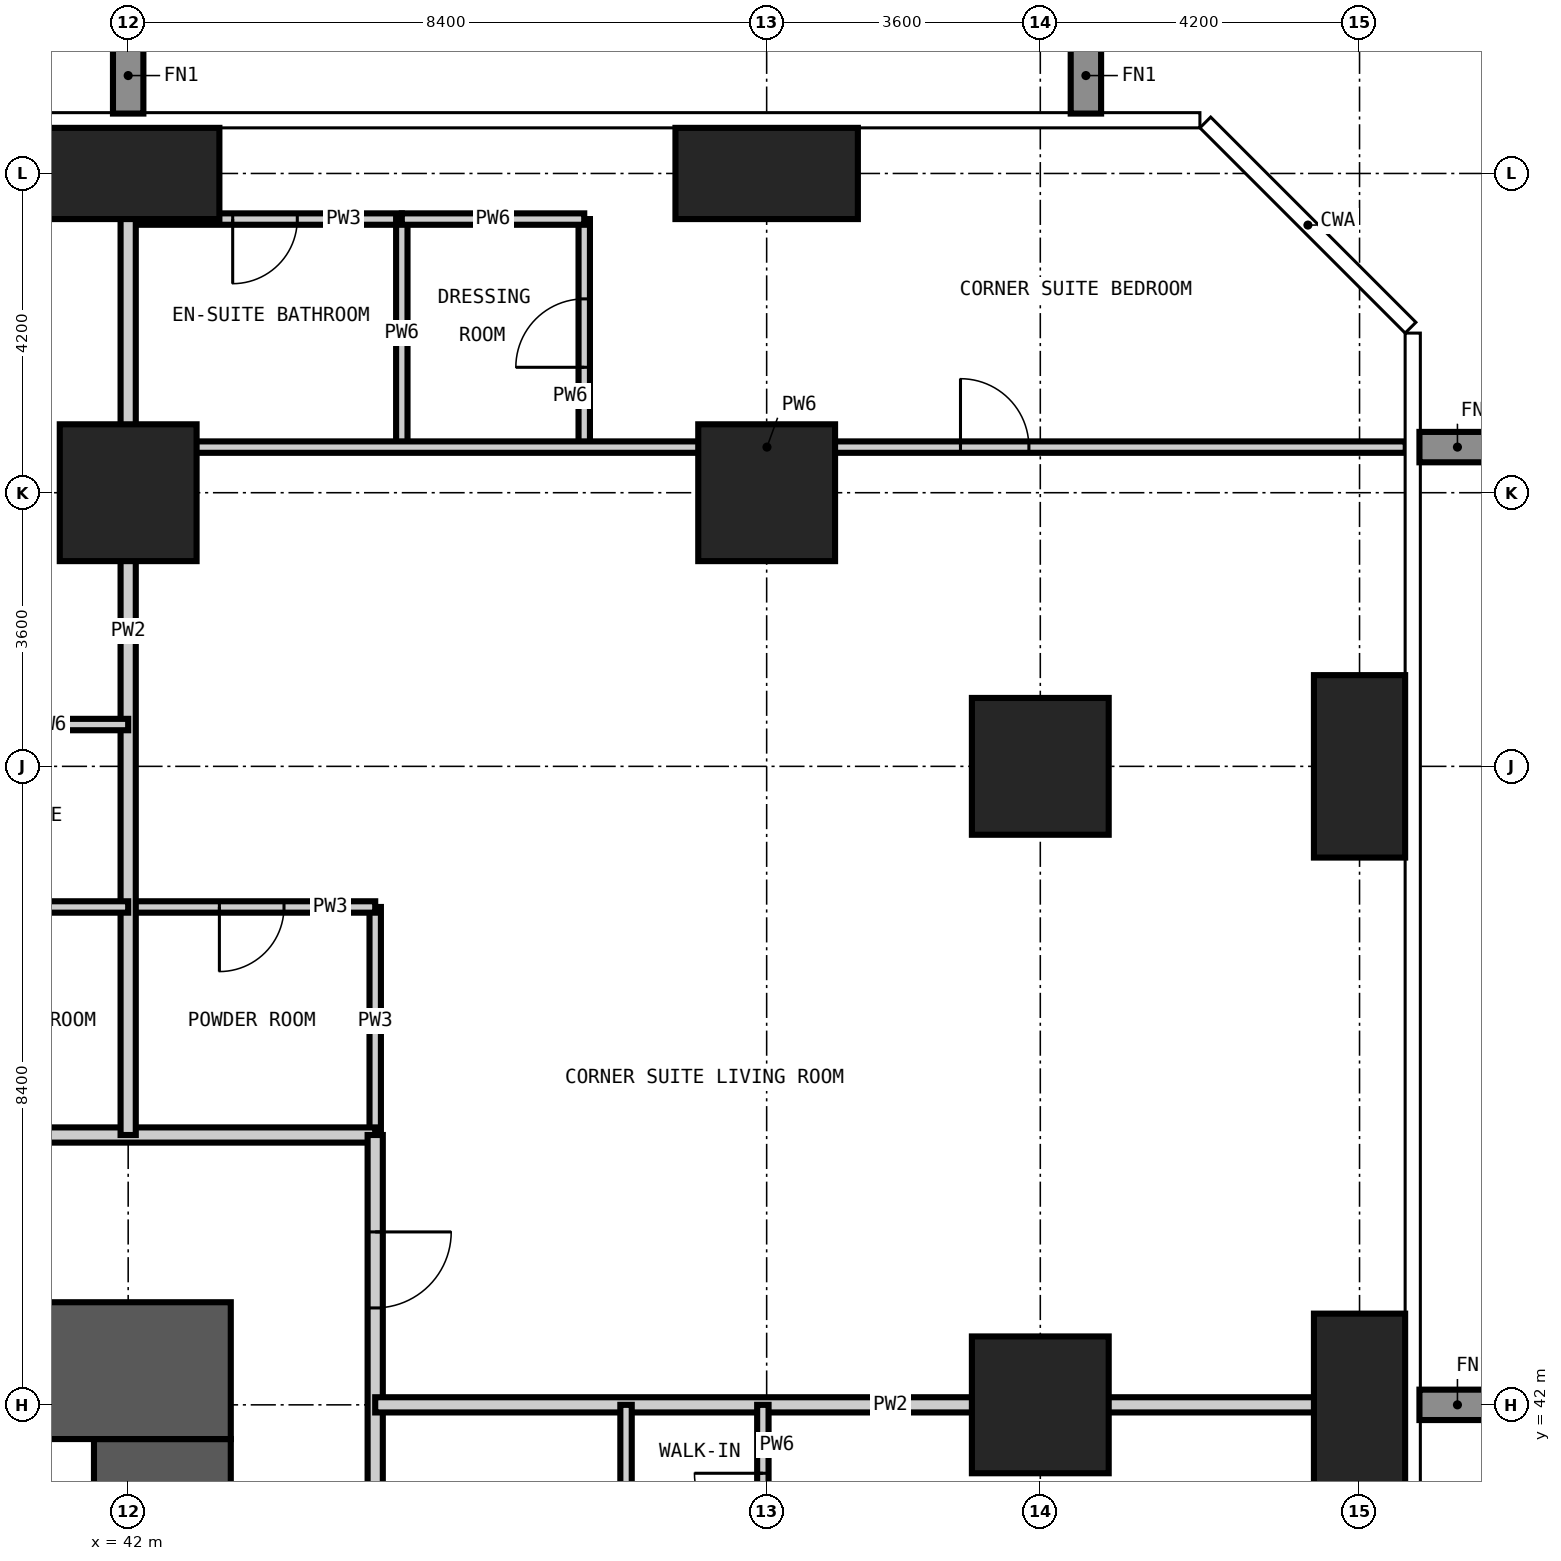
"""IFC4 building model, lengths in metres.
Left out: names, types, materials, properties, quantities, classifications, styles, units other than length and angle.
Written with IfcOpenShell. Run it as: python <this file> out.ifc"""

import sys

from ifc_helpers import new_model, si_unit, direction, frame, frame_2d, origin, origin_2d, place, context, subcontext, project, spatial, rectangle, extrude, element, fill, save


model = new_model("IFC4")
c1 = context("Model", 3, precision=1e-05, world=origin(), true_north=direction((0.0, 1.0)))
c2 = subcontext(c1, "Body", "Model", "MODEL_VIEW")
j1 = project(units=[si_unit("LENGTHUNIT", "METRE"), si_unit("PLANEANGLEUNIT", "RADIAN")], contexts=[c1])
p1 = place(None, origin())
s1 = spatial("IfcSite", under=j1, at=p1, CompositionType="ELEMENT")
p2 = place(p1, origin())
s2 = spatial("IfcBuilding", under=s1, at=p2, CompositionType="ELEMENT")
p3 = place(p2, frame((0.0, 0.0, 45.0)))
s3 = spatial("IfcBuildingStorey", under=s2, at=p3, CompositionType="ELEMENT", Elevation=45.0)
p4 = place(p3, frame((42.0, 54.0, -0.35), z_axis=(0.0, 0.0, 1.0), x_axis=(1.0, 0.0, 0.0)))
e1 = element("IfcColumn", 1, at=p4, inside=s3, PredefinedType="COLUMN", context=c2, shape_type="SweptSolid", body=[
    extrude(rectangle(XDim=1.8, YDim=1.8, at=origin_2d()), origin(), (0.0, 0.0, 1.0), 3.6),
])
p5 = place(p3, frame((42.0, 58.2, -0.35), z_axis=(0.0, 0.0, 1.0), x_axis=(1.0, 0.0, 0.0)))
e2 = element("IfcColumn", 2, at=p5, inside=s3, PredefinedType="COLUMN", context=c2, shape_type="SweptSolid", body=[
    extrude(rectangle(XDim=2.4, YDim=1.2, at=origin_2d()), origin(), (0.0, 0.0, 1.0), 3.6),
])
p6 = place(p3, frame((50.4, 54.0, -0.35), z_axis=(0.0, 0.0, 1.0), x_axis=(1.0, 0.0, 0.0)))
e3 = element("IfcColumn", 3, at=p6, inside=s3, PredefinedType="COLUMN", context=c2, shape_type="SweptSolid", body=[
    extrude(rectangle(XDim=1.8, YDim=1.8, at=origin_2d()), origin(), (0.0, 0.0, 1.0), 3.6),
])
p7 = place(p3, frame((50.4, 58.2, -0.35), z_axis=(0.0, 0.0, 1.0), x_axis=(1.0, 0.0, 0.0)))
e4 = element("IfcColumn", 4, at=p7, inside=s3, PredefinedType="COLUMN", context=c2, shape_type="SweptSolid", body=[
    extrude(rectangle(XDim=2.4, YDim=1.2, at=origin_2d()), origin(), (0.0, 0.0, 1.0), 3.6),
])
for number, where, z_axis, x_axis in (
    (5, (54.0, 42.0, -0.35), (0.0, 0.0, 1.0), (1.0, 0.0, 0.0)),
    (6, (54.0, 50.4, -0.35), (0.0, 0.0, 1.0), (1.0, 0.0, 0.0)),
):
    element("IfcColumn", number, at=place(p3, frame(where, z_axis=z_axis, x_axis=x_axis)), inside=s3, PredefinedType="COLUMN", context=c2, shape_type="SweptSolid", body=[
        extrude(rectangle(XDim=1.8, YDim=1.8, at=origin_2d()), origin(), (0.0, 0.0, 1.0), 3.6),
    ])
for number, where, z_axis, x_axis in (
    (7, (58.2, 42.0, -0.35), (0.0, 0.0, 1.0), (1.0, 0.0, 0.0)),
    (8, (58.2, 50.4, -0.35), (0.0, 0.0, 1.0), (1.0, 0.0, 0.0)),
):
    element("IfcColumn", number, at=place(p3, frame(where, z_axis=z_axis, x_axis=x_axis)), inside=s3, PredefinedType="COLUMN", context=c2, shape_type="SweptSolid", body=[
        extrude(rectangle(XDim=1.2, YDim=2.4, at=origin_2d()), origin(), (0.0, 0.0, 1.0), 3.6),
    ])
p8 = place(p3, frame((42.45, 17.25, -0.35), z_axis=(0.0, 0.0, 1.0), x_axis=(0.0, 1.0, 0.0)))
e9 = element("IfcWall", 9, at=p8, inside=s3, PredefinedType="SHEAR", context=c2, shape_type="SweptSolid", body=[
    extrude(rectangle(XDim=24.3, YDim=1.8, at=frame_2d((12.15, 0.0))), origin(), (0.0, 0.0, 1.0), 3.6),
])
p9 = place(p8, frame((0.35, 0.0, 0.35)))
e10 = element("IfcOpeningElement", 10, at=p9, cuts=e9, PredefinedType="OPENING", context=c2, shape_type="SweptSolid", body=[
    extrude(rectangle(XDim=1.2, YDim=2.2, at=frame_2d((0.6, 1.1))), frame((0.0, 0.91, 0.0), z_axis=(0.0, -1.0, 0.0), x_axis=(1.0, 0.0, 0.0)), (0.0, 0.0, 1.0), 1.82),
])
p10 = place(p8, frame((11.65, 0.0, 0.35)))
e11 = element("IfcOpeningElement", 11, at=p10, cuts=e9, PredefinedType="OPENING", context=c2, shape_type="SweptSolid", body=[
    extrude(rectangle(XDim=1.0, YDim=2.1, at=frame_2d((0.5, 1.05))), frame((0.0, 0.91, 0.0), z_axis=(0.0, -1.0, 0.0), x_axis=(1.0, 0.0, 0.0)), (0.0, 0.0, 1.0), 1.82),
])
p11 = place(p8, frame((20.05, 0.0, 0.35)))
e12 = element("IfcOpeningElement", 12, at=p11, cuts=e9, PredefinedType="OPENING", context=c2, shape_type="SweptSolid", body=[
    extrude(rectangle(XDim=1.0, YDim=2.1, at=frame_2d((0.5, 1.05))), frame((0.0, 0.91, 0.0), z_axis=(0.0, -1.0, 0.0), x_axis=(1.0, 0.0, 0.0)), (0.0, 0.0, 1.0), 1.82),
])
p12 = place(p3, frame((43.35, 42.45, -0.35), z_axis=(0.0, 0.0, 1.0), x_axis=(-1.0, 0.0, 0.0)))
e13 = element("IfcWall", 13, at=p12, inside=s3, PredefinedType="SHEAR", context=c2, shape_type="SweptSolid", body=[
    extrude(rectangle(XDim=27.9, YDim=1.8, at=frame_2d((13.95, 0.0))), origin(), (0.0, 0.0, 1.0), 3.6),
])
p13 = place(p12, frame((21.85, 0.0, 0.35)))
e14 = element("IfcOpeningElement", 14, at=p13, cuts=e13, PredefinedType="OPENING", context=c2, shape_type="SweptSolid", body=[
    extrude(rectangle(XDim=1.0, YDim=2.1, at=frame_2d((0.5, 1.05))), frame((0.0, 0.91, 0.0), z_axis=(0.0, -1.0, 0.0), x_axis=(1.0, 0.0, 0.0)), (0.0, 0.0, 1.0), 1.82),
])
p14 = place(p12, frame((11.25, 0.0, 0.35)))
e15 = element("IfcOpeningElement", 15, at=p14, cuts=e13, PredefinedType="OPENING", context=c2, shape_type="SweptSolid", body=[
    extrude(rectangle(XDim=1.2, YDim=2.2, at=frame_2d((0.6, 1.1))), frame((0.0, 0.91, 0.0), z_axis=(0.0, -1.0, 0.0), x_axis=(1.0, 0.0, 0.0)), (0.0, 0.0, 1.0), 1.82),
])
p15 = place(p3, frame((45.25, 45.55, 0.0), z_axis=(0.0, 0.0, 1.0), x_axis=(0.0, 1.0, 0.0)))
e16 = element("IfcWall", 16, at=p15, inside=s3, PredefinedType="PARTITIONING", context=c2, shape_type="SweptSolid", body=[
    extrude(rectangle(XDim=3.0, YDim=0.15, at=frame_2d((1.5, 0.0))), origin(), (0.0, 0.0, 1.0), 3.25),
])
p16 = place(p3, frame((42.0, 48.55, 0.0), z_axis=(0.0, 0.0, 1.0), x_axis=(1.0, 0.0, 0.0)))
e17 = element("IfcWall", 17, at=p16, inside=s3, PredefinedType="PARTITIONING", context=c2, shape_type="SweptSolid", body=[
    extrude(rectangle(XDim=3.25, YDim=0.15, at=frame_2d((1.625, 0.0))), origin(), (0.0, 0.0, 1.0), 3.25),
])
p17 = place(p16, frame((1.2, 0.0, 0.0)))
e18 = element("IfcOpeningElement", 18, at=p17, cuts=e17, PredefinedType="OPENING", context=c2, shape_type="SweptSolid", body=[
    extrude(rectangle(XDim=0.85, YDim=2.1, at=frame_2d((0.425, 1.05))), frame((0.0, 0.085, 0.0), z_axis=(0.0, -1.0, 0.0), x_axis=(1.0, 0.0, 0.0)), (0.0, 0.0, 1.0), 0.17),
])
p18 = place(p3, frame((42.0, 57.6, 0.0), z_axis=(0.0, 0.0, 1.0), x_axis=(1.0, 0.0, 0.0)))
e19 = element("IfcWall", 19, at=p18, inside=s3, PredefinedType="PARTITIONING", context=c2, shape_type="SweptSolid", body=[
    extrude(rectangle(XDim=3.6, YDim=0.15, at=frame_2d((1.8, 0.0))), origin(), (0.0, 0.0, 1.0), 3.25),
])
p19 = place(p18, frame((1.375, 0.0, 0.0)))
e20 = element("IfcOpeningElement", 20, at=p19, cuts=e19, PredefinedType="OPENING", context=c2, shape_type="SweptSolid", body=[
    extrude(rectangle(XDim=0.85, YDim=2.1, at=frame_2d((0.425, 1.05))), frame((0.0, 0.085, 0.0), z_axis=(0.0, -1.0, 0.0), x_axis=(1.0, 0.0, 0.0)), (0.0, 0.0, 1.0), 0.17),
])
p20 = place(p3, frame((12.95, 45.55, 0.0), z_axis=(0.0, 0.0, 1.0), x_axis=(1.0, 0.0, 0.0)))
e21 = element("IfcWall", 21, at=p20, inside=s3, PredefinedType="PARTITIONING", context=c2, shape_type="SweptSolid", body=[
    extrude(rectangle(XDim=32.3, YDim=0.2, at=frame_2d((16.15, 0.0))), origin(), (0.0, 0.0, 1.0), 3.25),
])
p21 = place(p20, frame((6.65, 0.0, 0.0)))
e22 = element("IfcOpeningElement", 22, at=p21, cuts=e21, PredefinedType="OPENING", context=c2, shape_type="SweptSolid", body=[
    extrude(rectangle(XDim=1.0, YDim=2.2, at=frame_2d((0.5, 1.1))), frame((0.0, 0.11, 0.0), z_axis=(0.0, -1.0, 0.0), x_axis=(1.0, 0.0, 0.0)), (0.0, 0.0, 1.0), 0.22),
])
p22 = place(p20, frame((15.05, 0.0, 0.0)))
e23 = element("IfcOpeningElement", 23, at=p22, cuts=e21, PredefinedType="OPENING", context=c2, shape_type="SweptSolid", body=[
    extrude(rectangle(XDim=1.0, YDim=2.2, at=frame_2d((0.5, 1.1))), frame((0.0, 0.11, 0.0), z_axis=(0.0, -1.0, 0.0), x_axis=(1.0, 0.0, 0.0)), (0.0, 0.0, 1.0), 0.22),
])
p23 = place(p20, frame((23.45, 0.0, 0.0)))
e24 = element("IfcOpeningElement", 24, at=p23, cuts=e21, PredefinedType="OPENING", context=c2, shape_type="SweptSolid", body=[
    extrude(rectangle(XDim=1.0, YDim=2.2, at=frame_2d((0.5, 1.1))), frame((0.0, 0.11, 0.0), z_axis=(0.0, -1.0, 0.0), x_axis=(1.0, 0.0, 0.0)), (0.0, 0.0, 1.0), 0.22),
])
p24 = place(p3, frame((45.25, 45.55, 0.0), z_axis=(0.0, 0.0, 1.0), x_axis=(0.0, -1.0, 0.0)))
e25 = element("IfcWall", 25, at=p24, inside=s3, PredefinedType="PARTITIONING", context=c2, shape_type="SweptSolid", body=[
    extrude(rectangle(XDim=32.6, YDim=0.2, at=frame_2d((16.3, 0.0))), origin(), (0.0, 0.0, 1.0), 3.25),
])
p25 = place(p24, frame((24.8, 0.0, 0.0)))
e26 = element("IfcOpeningElement", 26, at=p25, cuts=e25, PredefinedType="OPENING", context=c2, shape_type="SweptSolid", body=[
    extrude(rectangle(XDim=1.0, YDim=2.2, at=frame_2d((0.5, 1.1))), frame((0.0, 0.11, 0.0), z_axis=(0.0, -1.0, 0.0), x_axis=(1.0, 0.0, 0.0)), (0.0, 0.0, 1.0), 0.22),
])
p26 = place(p24, frame((19.85, 0.0, 0.0)))
e27 = element("IfcOpeningElement", 27, at=p26, cuts=e25, PredefinedType="OPENING", context=c2, shape_type="SweptSolid", body=[
    extrude(rectangle(XDim=1.0, YDim=2.2, at=frame_2d((0.5, 1.1))), frame((0.0, 0.11, 0.0), z_axis=(0.0, -1.0, 0.0), x_axis=(1.0, 0.0, 0.0)), (0.0, 0.0, 1.0), 0.22),
])
p27 = place(p24, frame((11.45, 0.0, 0.0)))
e28 = element("IfcOpeningElement", 28, at=p27, cuts=e25, PredefinedType="OPENING", context=c2, shape_type="SweptSolid", body=[
    extrude(rectangle(XDim=1.0, YDim=2.2, at=frame_2d((0.5, 1.1))), frame((0.0, 0.11, 0.0), z_axis=(0.0, -1.0, 0.0), x_axis=(1.0, 0.0, 0.0)), (0.0, 0.0, 1.0), 0.22),
])
p28 = place(p24, frame((6.5, 0.0, 0.0)))
e29 = element("IfcOpeningElement", 29, at=p28, cuts=e25, PredefinedType="OPENING", context=c2, shape_type="SweptSolid", body=[
    extrude(rectangle(XDim=1.0, YDim=2.2, at=frame_2d((0.5, 1.1))), frame((0.0, 0.11, 0.0), z_axis=(0.0, -1.0, 0.0), x_axis=(1.0, 0.0, 0.0)), (0.0, 0.0, 1.0), 0.22),
])
p29 = place(p24, frame((30.175, 0.0, 0.0)))
e30 = element("IfcOpeningElement", 30, at=p29, cuts=e25, PredefinedType="OPENING", context=c2, shape_type="SweptSolid", body=[
    extrude(rectangle(XDim=1.0, YDim=2.2, at=frame_2d((0.5, 1.1))), frame((0.0, 0.11, 0.0), z_axis=(0.0, -1.0, 0.0), x_axis=(1.0, 0.0, 0.0)), (0.0, 0.0, 1.0), 0.22),
])
p30 = place(p24, frame((1.275, 0.0, 0.0)))
e31 = element("IfcOpeningElement", 31, at=p30, cuts=e25, PredefinedType="OPENING", context=c2, shape_type="SweptSolid", body=[
    extrude(rectangle(XDim=1.0, YDim=2.2, at=frame_2d((0.5, 1.1))), frame((0.0, 0.11, 0.0), z_axis=(0.0, -1.0, 0.0), x_axis=(1.0, 0.0, 0.0)), (0.0, 0.0, 1.0), 0.22),
])
p31 = place(p3, frame((42.0, 45.55, 0.0), z_axis=(0.0, 0.0, 1.0), x_axis=(0.0, 1.0, 0.0)))
e32 = element("IfcWall", 32, at=p31, inside=s3, PredefinedType="PARTITIONING", context=c2, shape_type="SweptSolid", body=[
    extrude(rectangle(XDim=13.258, YDim=0.2, at=frame_2d((6.629, 0.0))), origin(), (0.0, 0.0, 1.0), 3.25),
])
p32 = place(p3, frame((45.25, 42.0, 0.0), z_axis=(0.0, 0.0, 1.0), x_axis=(1.0, 0.0, 0.0)))
e33 = element("IfcWall", 33, at=p32, inside=s3, PredefinedType="PARTITIONING", context=c2, shape_type="SweptSolid", body=[
    extrude(rectangle(XDim=13.558, YDim=0.2, at=frame_2d((6.779, 0.0))), origin(), (0.0, 0.0, 1.0), 3.25),
])
p33 = place(p3, frame((45.6, 54.6, 0.0), z_axis=(0.0, 0.0, 1.0), x_axis=(0.0, 1.0, 0.0)))
e34 = element("IfcWall", 34, at=p33, inside=s3, PredefinedType="PARTITIONING", context=c2, shape_type="SweptSolid", body=[
    extrude(rectangle(XDim=3.0, YDim=0.15, at=frame_2d((1.5, 0.0))), origin(), (0.0, 0.0, 1.0), 3.25),
])
p34 = place(p3, frame((48.0, 54.6, 0.0), z_axis=(0.0, 0.0, 1.0), x_axis=(0.0, 1.0, 0.0)))
e35 = element("IfcWall", 35, at=p34, inside=s3, PredefinedType="PARTITIONING", context=c2, shape_type="SweptSolid", body=[
    extrude(rectangle(XDim=3.0, YDim=0.15, at=frame_2d((1.5, 0.0))), origin(), (0.0, 0.0, 1.0), 3.25),
])
p35 = place(p34, frame((1.05, 0.0, 0.0)))
e36 = element("IfcOpeningElement", 36, at=p35, cuts=e35, PredefinedType="OPENING", context=c2, shape_type="SweptSolid", body=[
    extrude(rectangle(XDim=0.9, YDim=2.1, at=frame_2d((0.45, 1.05))), frame((0.0, 0.085, 0.0), z_axis=(0.0, -1.0, 0.0), x_axis=(1.0, 0.0, 0.0)), (0.0, 0.0, 1.0), 0.17),
])
p36 = place(p3, frame((48.55, 39.3, 0.0), z_axis=(0.0, 0.0, 1.0), x_axis=(0.0, 1.0, 0.0)))
e37 = element("IfcWall", 37, at=p36, inside=s3, PredefinedType="PARTITIONING", context=c2, shape_type="SweptSolid", body=[
    extrude(rectangle(XDim=2.7, YDim=0.15, at=frame_2d((1.35, 0.0))), origin(), (0.0, 0.0, 1.0), 3.25),
])
p37 = place(p3, frame((50.35, 39.3, 0.0), z_axis=(0.0, 0.0, 1.0), x_axis=(0.0, 1.0, 0.0)))
e38 = element("IfcWall", 38, at=p37, inside=s3, PredefinedType="PARTITIONING", context=c2, shape_type="SweptSolid", body=[
    extrude(rectangle(XDim=2.7, YDim=0.15, at=frame_2d((1.35, 0.0))), origin(), (0.0, 0.0, 1.0), 3.25),
])
p38 = place(p37, frame((0.9, 0.0, 0.0)))
e39 = element("IfcOpeningElement", 39, at=p38, cuts=e38, PredefinedType="OPENING", context=c2, shape_type="SweptSolid", body=[
    extrude(rectangle(XDim=0.9, YDim=2.1, at=frame_2d((0.45, 1.05))), frame((0.0, 0.085, 0.0), z_axis=(0.0, -1.0, 0.0), x_axis=(1.0, 0.0, 0.0)), (0.0, 0.0, 1.0), 0.17),
])
p39 = place(p3, frame((37.8, 48.55, 0.0), z_axis=(0.0, 0.0, 1.0), x_axis=(1.0, 0.0, 0.0)))
e40 = element("IfcWall", 40, at=p39, inside=s3, PredefinedType="PARTITIONING", context=c2, shape_type="SweptSolid", body=[
    extrude(rectangle(XDim=4.2, YDim=0.15, at=frame_2d((2.1, 0.0))), origin(), (0.0, 0.0, 1.0), 3.25),
])
p40 = place(p3, frame((37.8, 50.95, 0.0), z_axis=(0.0, 0.0, 1.0), x_axis=(1.0, 0.0, 0.0)))
e41 = element("IfcWall", 41, at=p40, inside=s3, PredefinedType="PARTITIONING", context=c2, shape_type="SweptSolid", body=[
    extrude(rectangle(XDim=4.2, YDim=0.15, at=frame_2d((2.1, 0.0))), origin(), (0.0, 0.0, 1.0), 3.25),
])
p41 = place(p40, frame((1.65, 0.0, 0.0)))
e42 = element("IfcOpeningElement", 42, at=p41, cuts=e41, PredefinedType="OPENING", context=c2, shape_type="SweptSolid", body=[
    extrude(rectangle(XDim=0.9, YDim=2.1, at=frame_2d((0.45, 1.05))), frame((0.0, 0.085, 0.0), z_axis=(0.0, -1.0, 0.0), x_axis=(1.0, 0.0, 0.0)), (0.0, 0.0, 1.0), 0.17),
])
p42 = place(p3, frame((42.0, 54.6, 0.0), z_axis=(0.0, 0.0, 1.0), x_axis=(1.0, 0.0, 0.0)))
e43 = element("IfcWall", 43, at=p42, inside=s3, PredefinedType="PARTITIONING", context=c2, shape_type="SweptSolid", body=[
    extrude(rectangle(XDim=16.808, YDim=0.15, at=frame_2d((8.404, 0.0))), origin(), (0.0, 0.0, 1.0), 3.25),
])
p43 = place(p42, frame((10.95, 0.0, 0.0)))
e44 = element("IfcOpeningElement", 44, at=p43, cuts=e43, PredefinedType="OPENING", context=c2, shape_type="SweptSolid", body=[
    extrude(rectangle(XDim=0.9, YDim=2.1, at=frame_2d((0.45, 1.05))), frame((0.0, 0.085, 0.0), z_axis=(0.0, -1.0, 0.0), x_axis=(1.0, 0.0, 0.0)), (0.0, 0.0, 1.0), 0.17),
])
p44 = place(p3, frame((45.6, 57.6, 0.0), z_axis=(0.0, 0.0, 1.0), x_axis=(1.0, 0.0, 0.0)))
e45 = element("IfcWall", 45, at=p44, inside=s3, PredefinedType="PARTITIONING", context=c2, shape_type="SweptSolid", body=[
    extrude(rectangle(XDim=2.4, YDim=0.15, at=frame_2d((1.2, 0.0))), origin(), (0.0, 0.0, 1.0), 3.25),
])
p45 = place(p38, origin())
e46 = element("IfcDoor", 46, at=p45, inside=s3, OperationType="SINGLE_SWING_RIGHT", PredefinedType="DOOR", context=c2, shape_type="SweptSolid", body=[
    extrude(rectangle(XDim=0.9, YDim=2.1, at=frame_2d((0.45, 1.05))), frame((0.0, 0.025, 0.0), z_axis=(0.0, -1.0, 0.0), x_axis=(1.0, 0.0, 0.0)), (0.0, 0.0, 1.0), 0.05),
])
fill(e39, e46)
p46 = place(p30, origin())
e47 = element("IfcDoor", 47, at=p46, inside=s3, OperationType="SINGLE_SWING_LEFT", PredefinedType="DOOR", context=c2, shape_type="SweptSolid", body=[
    extrude(rectangle(XDim=1.0, YDim=2.2, at=frame_2d((0.5, 1.1))), frame((0.0, 0.025, 0.0), z_axis=(0.0, -1.0, 0.0), x_axis=(1.0, 0.0, 0.0)), (0.0, 0.0, 1.0), 0.05),
])
fill(e31, e47)
p47 = place(p17, frame((0.85, 0.0, 0.0), z_axis=(0.0, 0.0, 1.0), x_axis=(-1.0, 0.0, 0.0)))
e48 = element("IfcDoor", 48, at=p47, inside=s3, OperationType="SINGLE_SWING_RIGHT", PredefinedType="DOOR", context=c2, shape_type="SweptSolid", body=[
    extrude(rectangle(XDim=0.85, YDim=2.1, at=frame_2d((0.425, 1.05))), frame((0.0, 0.025, 0.0), z_axis=(0.0, -1.0, 0.0), x_axis=(1.0, 0.0, 0.0)), (0.0, 0.0, 1.0), 0.05),
])
fill(e18, e48)
p48 = place(p43, origin())
e49 = element("IfcDoor", 49, at=p48, inside=s3, OperationType="SINGLE_SWING_LEFT", PredefinedType="DOOR", context=c2, shape_type="SweptSolid", body=[
    extrude(rectangle(XDim=0.9, YDim=2.1, at=frame_2d((0.45, 1.05))), frame((0.0, 0.025, 0.0), z_axis=(0.0, -1.0, 0.0), x_axis=(1.0, 0.0, 0.0)), (0.0, 0.0, 1.0), 0.05),
])
fill(e44, e49)
p49 = place(p19, frame((0.85, 0.0, 0.0), z_axis=(0.0, 0.0, 1.0), x_axis=(-1.0, 0.0, 0.0)))
e50 = element("IfcDoor", 50, at=p49, inside=s3, OperationType="SINGLE_SWING_RIGHT", PredefinedType="DOOR", context=c2, shape_type="SweptSolid", body=[
    extrude(rectangle(XDim=0.85, YDim=2.1, at=frame_2d((0.425, 1.05))), frame((0.0, 0.025, 0.0), z_axis=(0.0, -1.0, 0.0), x_axis=(1.0, 0.0, 0.0)), (0.0, 0.0, 1.0), 0.05),
])
fill(e20, e50)
p50 = place(p35, origin())
e51 = element("IfcDoor", 51, at=p50, inside=s3, OperationType="SINGLE_SWING_LEFT", PredefinedType="DOOR", context=c2, shape_type="SweptSolid", body=[
    extrude(rectangle(XDim=0.9, YDim=2.1, at=frame_2d((0.45, 1.05))), frame((0.0, 0.025, 0.0), z_axis=(0.0, -1.0, 0.0), x_axis=(1.0, 0.0, 0.0)), (0.0, 0.0, 1.0), 0.05),
])
fill(e36, e51)
save(model, sys.argv[1])
